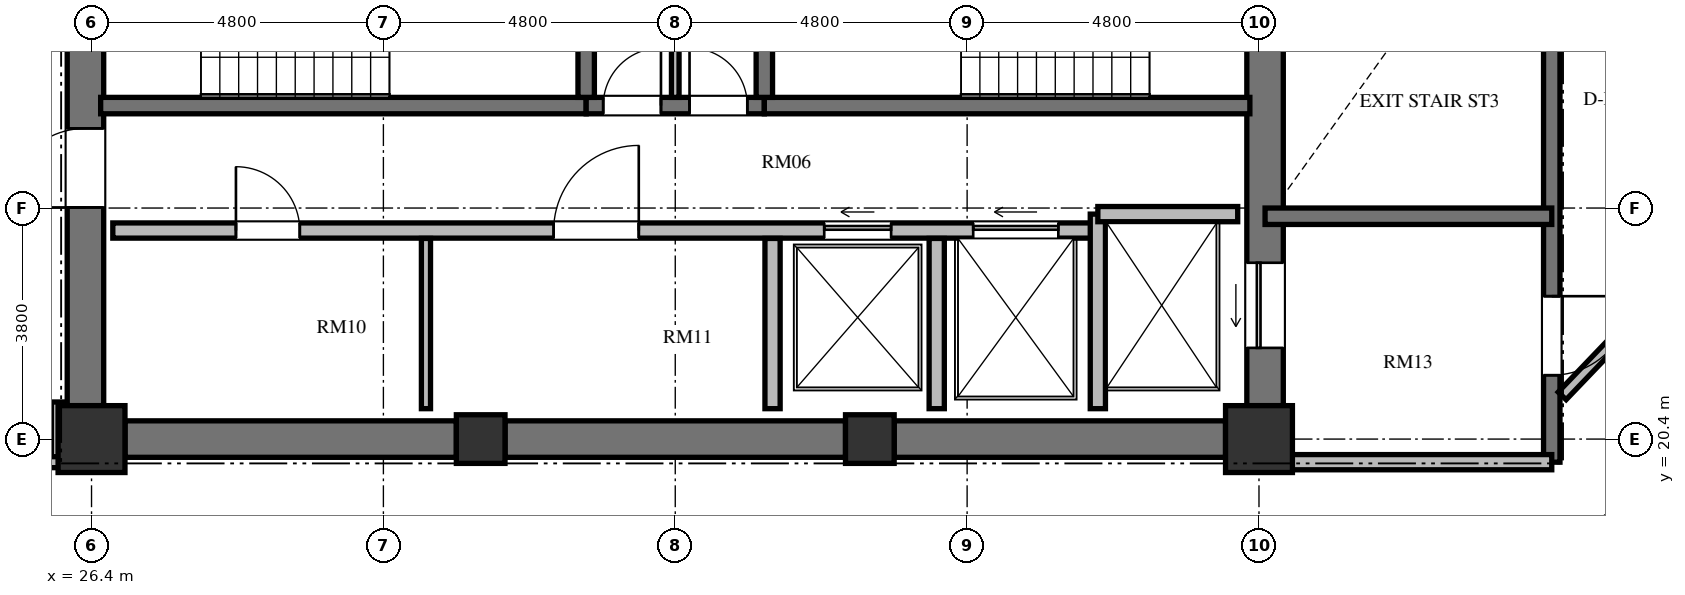
"""IFC4 building model, lengths in metres.
Left out: names, types, materials, properties, quantities, classifications, styles, units other than length and angle.
Written with IfcOpenShell. Run it as: python <this file> out.ifc"""

import sys

from ifc_helpers import new_model, si_unit, direction, frame, frame_2d, origin, origin_2d, place, context, subcontext, project, spatial, rectangle, extrude, element, fill, save


model = new_model("IFC4")
c1 = context("Model", 3, precision=1e-05, world=origin(), true_north=direction((0.0, 1.0)))
c2 = subcontext(c1, "Body", "Model", "MODEL_VIEW")
j1 = project(units=[si_unit("LENGTHUNIT", "METRE"), si_unit("PLANEANGLEUNIT", "RADIAN")], contexts=[c1])
p1 = place(None, origin())
s1 = spatial("IfcSite", under=j1, at=p1, CompositionType="ELEMENT")
p2 = place(p1, origin())
s2 = spatial("IfcBuilding", under=s1, at=p2, CompositionType="ELEMENT")
p3 = place(p2, frame((0.0, 0.0, 209.424)))
s3 = spatial("IfcBuildingStorey", under=s2, at=p3, CompositionType="ELEMENT", Elevation=209.424)
p4 = place(p3, frame((26.4, 20.4, 0.0), z_axis=(0.0, 0.0, 1.0), x_axis=(1.0, 0.0, 0.0)))
e1 = element("IfcColumn", 1, at=p4, inside=s3, PredefinedType="COLUMN", context=c2, shape_type="SweptSolid", body=[
    extrude(rectangle(XDim=1.1, YDim=1.1, at=origin_2d()), origin(), (0.0, 0.0, 1.0), 3.648),
])
for number, where, z_axis, x_axis in (
    (2, (32.8, 20.4, 0.0), (0.0, 0.0, 1.0), (1.0, 0.0, 0.0)),
    (3, (39.2, 20.4, 0.0), (0.0, 0.0, 1.0), (1.0, 0.0, 0.0)),
):
    element("IfcColumn", number, at=place(p3, frame(where, z_axis=z_axis, x_axis=x_axis)), inside=s3, PredefinedType="COLUMN", context=c2, shape_type="SweptSolid", body=[
        extrude(rectangle(XDim=0.8, YDim=0.8, at=origin_2d()), origin(), (0.0, 0.0, 1.0), 3.648),
    ])
p5 = place(p3, frame((45.6, 20.4, 0.0), z_axis=(0.0, 0.0, 1.0), x_axis=(1.0, 0.0, 0.0)))
e4 = element("IfcColumn", 4, at=p5, inside=s3, PredefinedType="COLUMN", context=c2, shape_type="SweptSolid", body=[
    extrude(rectangle(XDim=1.1, YDim=1.1, at=origin_2d()), origin(), (0.0, 0.0, 1.0), 3.648),
])
p6 = place(p3, frame((26.3, 20.95, 0.0), z_axis=(0.0, 0.0, 1.0), x_axis=(0.0, 1.0, 0.0)))
e5 = element("IfcWall", 5, at=p6, inside=s3, PredefinedType="SHEAR", context=c2, shape_type="SweptSolid", body=[
    extrude(rectangle(XDim=14.1, YDim=0.6, at=frame_2d((7.05, 0.0))), origin(), (0.0, 0.0, 1.0), 3.648),
])
p7 = place(p6, frame((6.5, 0.0, 0.0)))
e6 = element("IfcOpeningElement", 6, at=p7, cuts=e5, PredefinedType="OPENING", context=c2, shape_type="SweptSolid", body=[
    extrude(rectangle(XDim=1.2, YDim=2.15, at=frame_2d((0.6, 1.075))), frame((0.0, 0.31, 0.0), z_axis=(0.0, -1.0, 0.0), x_axis=(1.0, 0.0, 0.0)), (0.0, 0.0, 1.0), 0.62),
])
p8 = place(p6, frame((9.6, 0.0, 0.0)))
e7 = element("IfcOpeningElement", 7, at=p8, cuts=e5, PredefinedType="OPENING", context=c2, shape_type="SweptSolid", body=[
    extrude(rectangle(XDim=1.3, YDim=2.2, at=frame_2d((0.65, 1.1))), frame((0.0, 0.31, 0.0), z_axis=(0.0, -1.0, 0.0), x_axis=(1.0, 0.0, 0.0)), (0.0, 0.0, 1.0), 0.62),
])
p9 = place(p6, frame((3.26, 0.0, 0.0)))
e8 = element("IfcOpeningElement", 8, at=p9, cuts=e5, PredefinedType="OPENING", context=c2, shape_type="SweptSolid", body=[
    extrude(rectangle(XDim=1.3, YDim=2.2, at=frame_2d((0.65, 1.1))), frame((0.0, 0.31, 0.0), z_axis=(0.0, -1.0, 0.0), x_axis=(1.0, 0.0, 0.0)), (0.0, 0.0, 1.0), 0.62),
])
p10 = place(p3, frame((45.7, 20.95, 0.0), z_axis=(0.0, 0.0, 1.0), x_axis=(0.0, 1.0, 0.0)))
e9 = element("IfcWall", 9, at=p10, inside=s3, PredefinedType="SHEAR", context=c2, shape_type="SweptSolid", body=[
    extrude(rectangle(XDim=14.1, YDim=0.6, at=frame_2d((7.05, 0.0))), origin(), (0.0, 0.0, 1.0), 3.648),
])
p11 = place(p10, frame((11.75, 0.0, 0.0)))
e10 = element("IfcOpeningElement", 10, at=p11, cuts=e9, PredefinedType="OPENING", context=c2, shape_type="SweptSolid", body=[
    extrude(rectangle(XDim=1.4, YDim=2.3, at=frame_2d((0.7, 1.15))), frame((0.0, 0.31, 0.0), z_axis=(0.0, -1.0, 0.0), x_axis=(1.0, 0.0, 0.0)), (0.0, 0.0, 1.0), 0.62),
])
p12 = place(p10, frame((0.95, 0.0, 0.0)))
e11 = element("IfcOpeningElement", 11, at=p12, cuts=e9, PredefinedType="OPENING", context=c2, shape_type="SweptSolid", body=[
    extrude(rectangle(XDim=1.4, YDim=2.3, at=frame_2d((0.7, 1.15))), frame((0.0, 0.31, 0.0), z_axis=(0.0, -1.0, 0.0), x_axis=(1.0, 0.0, 0.0)), (0.0, 0.0, 1.0), 0.62),
])
p13 = place(p3, frame((26.95, 20.4, 0.0), z_axis=(0.0, 0.0, 1.0), x_axis=(1.0, 0.0, 0.0)))
e12 = element("IfcWall", 12, at=p13, inside=s3, PredefinedType="SHEAR", context=c2, shape_type="SweptSolid", body=[
    extrude(rectangle(XDim=5.45, YDim=0.6, at=frame_2d((2.725, 0.0))), origin(), (0.0, 0.0, 1.0), 3.648),
])
p14 = place(p3, frame((33.2, 20.4, 0.0), z_axis=(0.0, 0.0, 1.0), x_axis=(1.0, 0.0, 0.0)))
e13 = element("IfcWall", 13, at=p14, inside=s3, PredefinedType="SHEAR", context=c2, shape_type="SweptSolid", body=[
    extrude(rectangle(XDim=5.6, YDim=0.6, at=frame_2d((2.8, 0.0))), origin(), (0.0, 0.0, 1.0), 3.648),
])
p15 = place(p3, frame((39.6, 20.4, 0.0), z_axis=(0.0, 0.0, 1.0), x_axis=(1.0, 0.0, 0.0)))
e14 = element("IfcWall", 14, at=p15, inside=s3, PredefinedType="SHEAR", context=c2, shape_type="SweptSolid", body=[
    extrude(rectangle(XDim=5.45, YDim=0.6, at=frame_2d((2.725, 0.0))), origin(), (0.0, 0.0, 1.0), 3.648),
])
p16 = place(p3, frame((26.55, 25.885, 0.0), z_axis=(0.0, 0.0, 1.0), x_axis=(1.0, 0.0, 0.0)))
e15 = element("IfcWall", 15, at=p16, inside=s3, PredefinedType="SHEAR", context=c2, shape_type="SweptSolid", body=[
    extrude(rectangle(XDim=7.985, YDim=0.27, at=frame_2d((3.992, 0.0))), origin(), (0.0, 0.0, 1.0), 3.648),
])
p17 = place(p3, frame((34.535, 25.885, 0.0), z_axis=(0.0, 0.0, 1.0), x_axis=(1.0, 0.0, 0.0)))
e16 = element("IfcWall", 16, at=p17, inside=s3, PredefinedType="SHEAR", context=c2, shape_type="SweptSolid", body=[
    extrude(rectangle(XDim=2.93, YDim=0.27, at=frame_2d((1.465, 0.0))), origin(), (0.0, 0.0, 1.0), 3.648),
])
p18 = place(p17, frame((0.28, 0.0, 0.0)))
e17 = element("IfcOpeningElement", 17, at=p18, cuts=e16, PredefinedType="OPENING", context=c2, shape_type="SweptSolid", body=[
    extrude(rectangle(XDim=0.95, YDim=2.1, at=frame_2d((0.475, 1.05))), frame((0.0, 0.145, 0.0), z_axis=(0.0, -1.0, 0.0), x_axis=(1.0, 0.0, 0.0)), (0.0, 0.0, 1.0), 0.29),
])
p19 = place(p17, frame((1.7, 0.0, 0.0)))
e18 = element("IfcOpeningElement", 18, at=p19, cuts=e16, PredefinedType="OPENING", context=c2, shape_type="SweptSolid", body=[
    extrude(rectangle(XDim=0.95, YDim=2.1, at=frame_2d((0.475, 1.05))), frame((0.0, 0.145, 0.0), z_axis=(0.0, -1.0, 0.0), x_axis=(1.0, 0.0, 0.0)), (0.0, 0.0, 1.0), 0.29),
])
p20 = place(p3, frame((37.465, 25.885, 0.0), z_axis=(0.0, 0.0, 1.0), x_axis=(1.0, 0.0, 0.0)))
e19 = element("IfcWall", 19, at=p20, inside=s3, PredefinedType="SHEAR", context=c2, shape_type="SweptSolid", body=[
    extrude(rectangle(XDim=7.985, YDim=0.27, at=frame_2d((3.992, 0.0))), origin(), (0.0, 0.0, 1.0), 3.648),
])
for number, where, z_axis, x_axis in (
    (20, (34.535, 26.02, 0.0), (0.0, 0.0, 1.0), (0.0, 1.0, 0.0)),
    (21, (37.465, 26.02, 0.0), (0.0, 0.0, 1.0), (0.0, 1.0, 0.0)),
):
    element("IfcWall", number, at=place(p3, frame(where, z_axis=z_axis, x_axis=x_axis)), inside=s3, PredefinedType="SHEAR", context=c2, shape_type="SweptSolid", body=[
        extrude(rectangle(XDim=4.08, YDim=0.27, at=frame_2d((2.04, 0.0))), origin(), (0.0, 0.0, 1.0), 3.648),
    ])
p21 = place(p3, frame((36.0, 26.02, 0.0), z_axis=(0.0, 0.0, 1.0), x_axis=(0.0, 1.0, 0.0)))
e22 = element("IfcWall", 22, at=p21, inside=s3, PredefinedType="PARTITIONING", context=c2, shape_type="SweptSolid", body=[
    extrude(rectangle(XDim=4.08, YDim=0.125, at=frame_2d((2.04, 0.0))), origin(), (0.0, 0.0, 1.0), 3.448),
])
p22 = place(p3, frame((26.75, 23.83, 0.0), z_axis=(0.0, 0.0, 1.0), x_axis=(1.0, 0.0, 0.0)))
e23 = element("IfcWall", 23, at=p22, inside=s3, PredefinedType="SOLIDWALL", context=c2, shape_type="SweptSolid", body=[
    extrude(rectangle(XDim=16.2, YDim=0.25, at=frame_2d((8.1, 0.0))), origin(), (0.0, 0.0, 1.0), 3.448),
])
p23 = place(p22, frame((2.025, 0.0, 0.0)))
e24 = element("IfcOpeningElement", 24, at=p23, cuts=e23, PredefinedType="OPENING", context=c2, shape_type="SweptSolid", body=[
    extrude(rectangle(XDim=1.05, YDim=2.15, at=frame_2d((0.525, 1.075))), frame((0.0, 0.135, 0.0), z_axis=(0.0, -1.0, 0.0), x_axis=(1.0, 0.0, 0.0)), (0.0, 0.0, 1.0), 0.27),
])
p24 = place(p22, frame((7.25, 0.0, 0.0)))
e25 = element("IfcOpeningElement", 25, at=p24, cuts=e23, PredefinedType="OPENING", context=c2, shape_type="SweptSolid", body=[
    extrude(rectangle(XDim=1.4, YDim=2.2, at=frame_2d((0.7, 1.1))), frame((0.0, 0.135, 0.0), z_axis=(0.0, -1.0, 0.0), x_axis=(1.0, 0.0, 0.0)), (0.0, 0.0, 1.0), 0.27),
])
p25 = place(p22, frame((11.7, 0.0, 0.0)))
e26 = element("IfcOpeningElement", 26, at=p25, cuts=e23, PredefinedType="OPENING", context=c2, shape_type="SweptSolid", body=[
    extrude(rectangle(XDim=1.1, YDim=2.2, at=frame_2d((0.55, 1.1))), frame((0.0, 0.135, 0.0), z_axis=(0.0, -1.0, 0.0), x_axis=(1.0, 0.0, 0.0)), (0.0, 0.0, 1.0), 0.27),
])
p26 = place(p22, frame((14.15, 0.0, 0.0)))
e27 = element("IfcOpeningElement", 27, at=p26, cuts=e23, PredefinedType="OPENING", context=c2, shape_type="SweptSolid", body=[
    extrude(rectangle(XDim=1.4, YDim=2.3, at=frame_2d((0.7, 1.15))), frame((0.0, 0.135, 0.0), z_axis=(0.0, -1.0, 0.0), x_axis=(1.0, 0.0, 0.0)), (0.0, 0.0, 1.0), 0.27),
])
p27 = place(p3, frame((42.95, 20.9, 0.0), z_axis=(0.0, 0.0, 1.0), x_axis=(0.0, 1.0, 0.0)))
e28 = element("IfcWall", 28, at=p27, inside=s3, PredefinedType="SOLIDWALL", context=c2, shape_type="SweptSolid", body=[
    extrude(rectangle(XDim=3.2, YDim=0.25, at=frame_2d((1.6, 0.0))), origin(), (0.0, 0.0, 1.0), 3.448),
])
p28 = place(p3, frame((42.95, 24.1, 0.0), z_axis=(0.0, 0.0, 1.0), x_axis=(1.0, 0.0, 0.0)))
e29 = element("IfcWall", 29, at=p28, inside=s3, PredefinedType="SOLIDWALL", context=c2, shape_type="SweptSolid", body=[
    extrude(rectangle(XDim=2.3, YDim=0.25, at=frame_2d((1.15, 0.0))), origin(), (0.0, 0.0, 1.0), 3.448),
])
for number, where, z_axis, x_axis in (
    (30, (37.6, 20.9, 0.0), (0.0, 0.0, 1.0), (0.0, 1.0, 0.0)),
    (31, (40.3, 20.9, 0.0), (0.0, 0.0, 1.0), (0.0, 1.0, 0.0)),
):
    element("IfcWall", number, at=place(p3, frame(where, z_axis=z_axis, x_axis=x_axis)), inside=s3, PredefinedType="SOLIDWALL", context=c2, shape_type="SweptSolid", body=[
        extrude(rectangle(XDim=2.8, YDim=0.25, at=frame_2d((1.4, 0.0))), origin(), (0.0, 0.0, 1.0), 3.448),
    ])
p29 = place(p3, frame((31.9, 20.9, 0.0), z_axis=(0.0, 0.0, 1.0), x_axis=(0.0, 1.0, 0.0)))
e32 = element("IfcWall", 32, at=p29, inside=s3, PredefinedType="PARTITIONING", context=c2, shape_type="SweptSolid", body=[
    extrude(rectangle(XDim=2.8, YDim=0.15, at=frame_2d((1.4, 0.0))), origin(), (0.0, 0.0, 1.0), 3.448),
])
p30 = place(p3, frame((50.415, 35.845, 0.0), z_axis=(0.0, 0.0, 1.0), x_axis=(0.0, -1.0, 0.0)))
e33 = element("IfcWall", 33, at=p30, inside=s3, PredefinedType="SHEAR", context=c2, shape_type="SweptSolid", body=[
    extrude(rectangle(XDim=15.825, YDim=0.27, at=frame_2d((7.913, 0.0))), origin(), (0.0, 0.0, 1.0), 3.648),
])
p31 = place(p30, frame((4.445, 0.0, 0.0)))
e34 = element("IfcOpeningElement", 34, at=p31, cuts=e33, PredefinedType="OPENING", context=c2, shape_type="SweptSolid", body=[
    extrude(rectangle(XDim=1.2, YDim=2.15, at=frame_2d((0.6, 1.075))), frame((0.0, 0.145, 0.0), z_axis=(0.0, -1.0, 0.0), x_axis=(1.0, 0.0, 0.0)), (0.0, 0.0, 1.0), 0.29),
])
p32 = place(p30, frame((1.295, 0.0, 0.0)))
e35 = element("IfcOpeningElement", 35, at=p32, cuts=e33, PredefinedType="OPENING", context=c2, shape_type="SweptSolid", body=[
    extrude(rectangle(XDim=1.3, YDim=2.2, at=frame_2d((0.65, 1.1))), frame((0.0, 0.145, 0.0), z_axis=(0.0, -1.0, 0.0), x_axis=(1.0, 0.0, 0.0)), (0.0, 0.0, 1.0), 0.29),
])
p33 = place(p30, frame((13.095, 0.0, 0.0)))
e36 = element("IfcOpeningElement", 36, at=p33, cuts=e33, PredefinedType="OPENING", context=c2, shape_type="SweptSolid", body=[
    extrude(rectangle(XDim=1.3, YDim=2.2, at=frame_2d((0.65, 1.1))), frame((0.0, 0.145, 0.0), z_axis=(0.0, -1.0, 0.0), x_axis=(1.0, 0.0, 0.0)), (0.0, 0.0, 1.0), 0.29),
])
p34 = place(p3, frame((45.7, 24.065, 0.0), z_axis=(0.0, 0.0, 1.0), x_axis=(1.0, 0.0, 0.0)))
e37 = element("IfcWall", 37, at=p34, inside=s3, PredefinedType="SHEAR", context=c2, shape_type="SweptSolid", body=[
    extrude(rectangle(XDim=4.715, YDim=0.27, at=frame_2d((2.357, 0.0))), origin(), (0.0, 0.0, 1.0), 3.648),
])
p35 = place(p3, frame((45.7, 20.02, 0.0), z_axis=(0.0, 0.0, 1.0), x_axis=(1.0, 0.0, 0.0)))
e38 = element("IfcWall", 38, at=p35, inside=s3, PredefinedType="SOLIDWALL", context=c2, shape_type="SweptSolid", body=[
    extrude(rectangle(XDim=4.715, YDim=0.25, at=frame_2d((2.357, 0.0))), origin(), (0.0, 0.0, 1.0), 3.448),
])
p36 = place(p3, frame((53.078, 23.714, 0.0), z_axis=(0.0, 0.0, 1.0), x_axis=(-0.691353379446, -0.722516785085, 0.0)))
e39 = element("IfcWall", 39, at=p36, inside=s3, PredefinedType="PARTITIONING", context=c2, shape_type="SweptSolid", body=[
    extrude(rectangle(XDim=3.604, YDim=0.18, at=frame_2d((1.802, 0.0))), origin(), (0.0, 0.0, 1.0), 3.448),
])
p37 = place(p3, frame((25.83, 21.01, 0.0), z_axis=(0.0, 0.0, 1.0), x_axis=(0.0, -1.0, 0.0)))
e40 = element("IfcWall", 40, at=p37, inside=s3, PredefinedType="PARTITIONING", context=c2, shape_type="SweptSolid", body=[
    extrude(rectangle(XDim=1.03, YDim=0.18, at=frame_2d((0.515, 0.0))), origin(), (0.0, 0.0, 1.0), 3.448),
])
p38 = place(p3, frame((25.87, 20.02, 0.0), z_axis=(0.0, 0.0, 1.0), x_axis=(-1.0, 0.0, 0.0)))
e41 = element("IfcWall", 41, at=p38, inside=s3, PredefinedType="PARTITIONING", context=c2, shape_type="SweptSolid", body=[
    extrude(rectangle(XDim=2.56, YDim=0.18, at=frame_2d((1.28, 0.0))), origin(), (0.0, 0.0, 1.0), 3.448),
])
p39 = place(p18, origin())
e42 = element("IfcDoor", 42, at=p39, inside=s3, OperationType="SINGLE_SWING_RIGHT", PredefinedType="DOOR", context=c2, shape_type="SweptSolid", body=[
    extrude(rectangle(XDim=0.95, YDim=2.1, at=frame_2d((0.475, 1.05))), frame((0.0, 0.025, 0.0), z_axis=(0.0, -1.0, 0.0), x_axis=(1.0, 0.0, 0.0)), (0.0, 0.0, 1.0), 0.05),
])
fill(e17, e42)
p40 = place(p19, origin())
e43 = element("IfcDoor", 43, at=p40, inside=s3, OperationType="SINGLE_SWING_LEFT", PredefinedType="DOOR", context=c2, shape_type="SweptSolid", body=[
    extrude(rectangle(XDim=0.95, YDim=2.1, at=frame_2d((0.475, 1.05))), frame((0.0, 0.025, 0.0), z_axis=(0.0, -1.0, 0.0), x_axis=(1.0, 0.0, 0.0)), (0.0, 0.0, 1.0), 0.05),
])
fill(e18, e43)
p41 = place(p9, origin())
e44 = element("IfcDoor", 44, at=p41, inside=s3, OperationType="SINGLE_SWING_LEFT", PredefinedType="DOOR", context=c2, shape_type="SweptSolid", body=[
    extrude(rectangle(XDim=1.3, YDim=2.2, at=frame_2d((0.65, 1.1))), frame((0.0, 0.025, 0.0), z_axis=(0.0, -1.0, 0.0), x_axis=(1.0, 0.0, 0.0)), (0.0, 0.0, 1.0), 0.05),
])
fill(e8, e44)
p42 = place(p23, origin())
e45 = element("IfcDoor", 45, at=p42, inside=s3, OperationType="SINGLE_SWING_LEFT", PredefinedType="DOOR", context=c2, shape_type="SweptSolid", body=[
    extrude(rectangle(XDim=1.05, YDim=2.15, at=frame_2d((0.525, 1.075))), frame((0.0, 0.025, 0.0), z_axis=(0.0, -1.0, 0.0), x_axis=(1.0, 0.0, 0.0)), (0.0, 0.0, 1.0), 0.05),
])
fill(e24, e45)
p43 = place(p24, origin())
e46 = element("IfcDoor", 46, at=p43, inside=s3, OperationType="SINGLE_SWING_RIGHT", PredefinedType="DOOR", context=c2, shape_type="SweptSolid", body=[
    extrude(rectangle(XDim=1.4, YDim=2.2, at=frame_2d((0.7, 1.1))), frame((0.0, 0.025, 0.0), z_axis=(0.0, -1.0, 0.0), x_axis=(1.0, 0.0, 0.0)), (0.0, 0.0, 1.0), 0.05),
])
fill(e25, e46)
p44 = place(p25, origin())
e47 = element("IfcDoor", 47, at=p44, inside=s3, OperationType="SLIDING_TO_LEFT", PredefinedType="DOOR", context=c2, shape_type="SweptSolid", body=[
    extrude(rectangle(XDim=1.1, YDim=2.2, at=frame_2d((0.55, 1.1))), frame((0.0, 0.025, 0.0), z_axis=(0.0, -1.0, 0.0), x_axis=(1.0, 0.0, 0.0)), (0.0, 0.0, 1.0), 0.05),
])
fill(e26, e47)
p45 = place(p12, origin())
e48 = element("IfcDoor", 48, at=p45, inside=s3, OperationType="SLIDING_TO_LEFT", PredefinedType="DOOR", context=c2, shape_type="SweptSolid", body=[
    extrude(rectangle(XDim=1.4, YDim=2.3, at=frame_2d((0.7, 1.15))), frame((0.0, 0.025, 0.0), z_axis=(0.0, -1.0, 0.0), x_axis=(1.0, 0.0, 0.0)), (0.0, 0.0, 1.0), 0.05),
])
fill(e11, e48)
p46 = place(p26, origin())
e49 = element("IfcDoor", 49, at=p46, inside=s3, OperationType="SLIDING_TO_LEFT", PredefinedType="DOOR", context=c2, shape_type="SweptSolid", body=[
    extrude(rectangle(XDim=1.4, YDim=2.3, at=frame_2d((0.7, 1.15))), frame((0.0, 0.025, 0.0), z_axis=(0.0, -1.0, 0.0), x_axis=(1.0, 0.0, 0.0)), (0.0, 0.0, 1.0), 0.05),
])
fill(e27, e49)
p47 = place(p33, origin())
e50 = element("IfcDoor", 50, at=p47, inside=s3, OperationType="SINGLE_SWING_LEFT", PredefinedType="DOOR", context=c2, shape_type="SweptSolid", body=[
    extrude(rectangle(XDim=1.3, YDim=2.2, at=frame_2d((0.65, 1.1))), frame((0.0, 0.025, 0.0), z_axis=(0.0, -1.0, 0.0), x_axis=(1.0, 0.0, 0.0)), (0.0, 0.0, 1.0), 0.05),
])
fill(e36, e50)
save(model, sys.argv[1])
